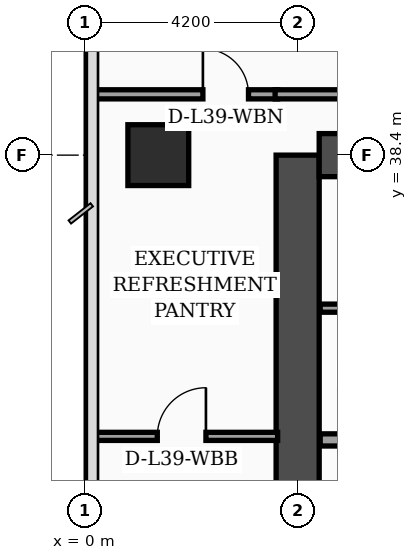
"""IFC4 building model, lengths in metres.
Left out: names, types, materials, properties, quantities, classifications, styles, units other than length and angle.
Written with IfcOpenShell. Run it as: python <this file> out.ifc"""

import sys

from ifc_helpers import new_model, si_unit, direction, frame, frame_2d, origin, origin_2d, place, context, subcontext, project, spatial, rectangle, extrude, element, fill, save


model = new_model("IFC4")
c1 = context("Model", 3, precision=1e-05, world=origin(), true_north=direction((0.0, 1.0)))
c2 = subcontext(c1, "Body", "Model", "MODEL_VIEW")
j1 = project(units=[si_unit("LENGTHUNIT", "METRE"), si_unit("PLANEANGLEUNIT", "RADIAN")], contexts=[c1])
p1 = place(None, origin())
s1 = spatial("IfcSite", under=j1, at=p1, CompositionType="ELEMENT")
p2 = place(p1, origin())
s2 = spatial("IfcBuilding", under=s1, at=p2, CompositionType="ELEMENT")
p3 = place(p2, frame((0.0, 0.0, 159.9)))
s3 = spatial("IfcBuildingStorey", under=s2, at=p3, CompositionType="ELEMENT", Elevation=159.9)
p4 = place(p3, frame((4.2, 16.8, 0.0), z_axis=(0.0, 0.0, 1.0), x_axis=(0.0, 1.0, 0.0)))
e1 = element("IfcWall", 1, at=p4, inside=s3, PredefinedType="SHEAR", context=c2, shape_type="SweptSolid", body=[
    extrude(rectangle(XDim=21.6, YDim=0.85, at=frame_2d((10.8, 0.0))), origin(), (0.0, 0.0, 1.0), 3.56),
])
p5 = place(p3, frame((4.625, 38.4, 0.0), z_axis=(0.0, 0.0, 1.0), x_axis=(1.0, 0.0, 0.0)))
e2 = element("IfcWall", 2, at=p5, inside=s3, PredefinedType="SHEAR", context=c2, shape_type="SweptSolid", body=[
    extrude(rectangle(XDim=9.95, YDim=0.85, at=frame_2d((4.975, 0.0))), origin(), (0.0, 0.0, 1.0), 3.56),
])
p6 = place(p3, frame((1.45, 38.4, 0.0), z_axis=(0.0, 0.0, 1.0), x_axis=(1.0, 0.0, 0.0)))
e3 = element("IfcColumn", 3, at=p6, inside=s3, PredefinedType="COLUMN", context=c2, shape_type="SweptSolid", body=[
    extrude(rectangle(XDim=1.2, YDim=1.2, at=origin_2d()), origin(), (0.0, 0.0, 1.0), 3.56),
])
p7 = place(p3, frame((4.645, 32.78, 0.0), z_axis=(0.0, 0.0, 1.0), x_axis=(1.0, 0.0, 0.0)))
e4 = element("IfcWall", 4, at=p7, inside=s3, PredefinedType="SOLIDWALL", context=c2, shape_type="SweptSolid", body=[
    extrude(rectangle(XDim=4.775, YDim=0.24, at=frame_2d((2.387, 0.0))), origin(), (0.0, 0.0, 1.0), 3.19),
])
p8 = place(p3, frame((4.645, 35.38, 0.0), z_axis=(0.0, 0.0, 1.0), x_axis=(1.0, 0.0, 0.0)))
e5 = element("IfcWall", 5, at=p8, inside=s3, PredefinedType="PARTITIONING", context=c2, shape_type="SweptSolid", body=[
    extrude(rectangle(XDim=4.775, YDim=0.16, at=frame_2d((2.387, 0.0))), origin(), (0.0, 0.0, 1.0), 3.56),
])
p9 = place(p8, frame((1.3, 0.0, 0.0)))
e6 = element("IfcOpeningElement", 6, at=p9, cuts=e5, PredefinedType="OPENING", context=c2, shape_type="SweptSolid", body=[
    extrude(rectangle(XDim=0.98, YDim=2.15, at=frame_2d((0.49, 1.075))), frame((0.0, 0.09, 0.0), z_axis=(0.0, -1.0, 0.0), x_axis=(1.0, 0.0, 0.0)), (0.0, 0.0, 1.0), 0.18),
])
p10 = place(p3, frame((0.08, 32.85, 0.0), z_axis=(0.0, 0.0, 1.0), x_axis=(1.0, 0.0, 0.0)))
e7 = element("IfcWall", 7, at=p10, inside=s3, PredefinedType="PARTITIONING", context=c2, shape_type="SweptSolid", body=[
    extrude(rectangle(XDim=3.725, YDim=0.16, at=frame_2d((1.862, 0.0))), origin(), (0.0, 0.0, 1.0), 3.04),
])
p11 = place(p10, frame((1.35, 0.0, 0.0)))
e8 = element("IfcOpeningElement", 8, at=p11, cuts=e7, PredefinedType="OPENING", context=c2, shape_type="SweptSolid", body=[
    extrude(rectangle(XDim=0.96, YDim=2.2, at=frame_2d((0.48, 1.1))), frame((0.0, 0.09, 0.0), z_axis=(0.0, -1.0, 0.0), x_axis=(1.0, 0.0, 0.0)), (0.0, 0.0, 1.0), 0.18),
])
p12 = place(p3, frame((0.08, 39.6, 0.0), z_axis=(0.0, 0.0, 1.0), x_axis=(1.0, 0.0, 0.0)))
e9 = element("IfcWall", 9, at=p12, inside=s3, PredefinedType="PARTITIONING", context=c2, shape_type="SweptSolid", body=[
    extrude(rectangle(XDim=3.725, YDim=0.18, at=frame_2d((1.862, 0.0))), origin(), (0.0, 0.0, 1.0), 2.94),
])
p13 = place(p12, frame((2.25, 0.0, 0.0)))
e10 = element("IfcOpeningElement", 10, at=p13, cuts=e9, PredefinedType="OPENING", context=c2, shape_type="SweptSolid", body=[
    extrude(rectangle(XDim=0.9, YDim=2.15, at=frame_2d((0.45, 1.075))), frame((0.0, 0.1, 0.0), z_axis=(0.0, -1.0, 0.0), x_axis=(1.0, 0.0, 0.0)), (0.0, 0.0, 1.0), 0.2),
])
p14 = place(p3, frame((3.755, 39.6, 0.0), z_axis=(0.0, 0.0, 1.0), x_axis=(1.0, 0.0, 0.0)))
e11 = element("IfcWall", 11, at=p14, inside=s3, PredefinedType="PARTITIONING", context=c2, shape_type="SweptSolid", body=[
    extrude(rectangle(XDim=11.395, YDim=0.18, at=frame_2d((5.698, 0.0))), origin(), (0.0, 0.0, 1.0), 2.94),
])
p15 = place(p11, origin())
e12 = element("IfcDoor", 12, at=p15, inside=s3, OperationType="SINGLE_SWING_RIGHT", PredefinedType="DOOR", context=c2, shape_type="SweptSolid", body=[
    extrude(rectangle(XDim=0.96, YDim=2.2, at=frame_2d((0.48, 1.1))), frame((0.0, 0.025, 0.0), z_axis=(0.0, -1.0, 0.0), x_axis=(1.0, 0.0, 0.0)), (0.0, 0.0, 1.0), 0.05),
])
fill(e8, e12)
p16 = place(p13, origin())
e13 = element("IfcDoor", 13, at=p16, inside=s3, OperationType="SINGLE_SWING_LEFT", PredefinedType="DOOR", context=c2, shape_type="SweptSolid", body=[
    extrude(rectangle(XDim=0.9, YDim=2.15, at=frame_2d((0.45, 1.075))), frame((0.0, 0.025, 0.0), z_axis=(0.0, -1.0, 0.0), x_axis=(1.0, 0.0, 0.0)), (0.0, 0.0, 1.0), 0.05),
])
fill(e10, e13)
save(model, sys.argv[1])
